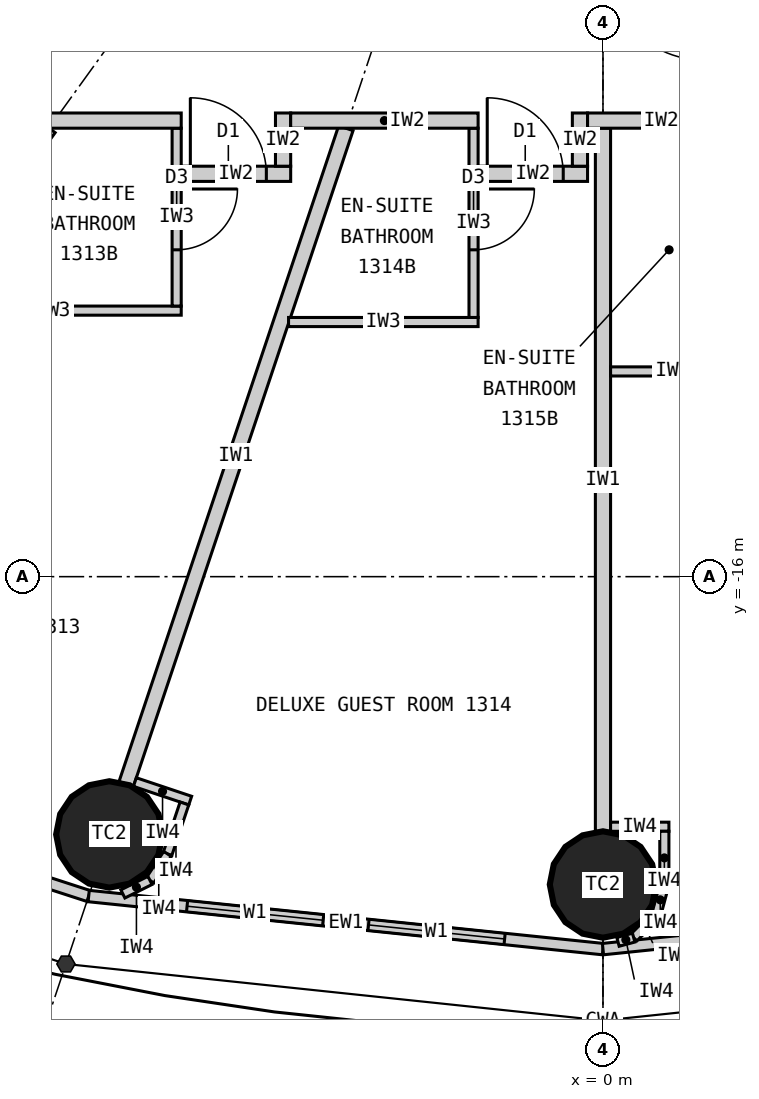
"""IFC4 building model, lengths in metres.
Left out: names, types, materials, properties, quantities, classifications, styles, units other than length and angle.
Written with IfcOpenShell. Run it as: python <this file> out.ifc"""

import sys

from ifc_helpers import new_model, si_unit, direction, frame, frame_2d, origin, origin_2d, place, context, subcontext, project, spatial, rectangle, circle, extrude, element, fill, save


model = new_model("IFC4")
c1 = context("Model", 3, precision=1e-05, world=origin(), true_north=direction((0.0, 1.0)))
c2 = subcontext(c1, "Body", "Model", "MODEL_VIEW")
j1 = project(units=[si_unit("LENGTHUNIT", "METRE"), si_unit("PLANEANGLEUNIT", "RADIAN")], contexts=[c1])
p1 = place(None, origin())
s1 = spatial("IfcSite", under=j1, at=p1, CompositionType="ELEMENT")
p2 = place(p1, origin())
s2 = spatial("IfcBuilding", under=s1, at=p2, CompositionType="ELEMENT")
p3 = place(p2, frame((0.0, 0.0, 57.3)))
s3 = spatial("IfcBuildingStorey", under=s2, at=p3, CompositionType="ELEMENT", Elevation=57.3)
for number, where, z_axis, x_axis in (
    (1, (-6.495, -19.391, 0.0), (0.0, 0.0, 1.0), (1.0, 0.0, 0.0)),
    (2, (0.0, -20.05, 0.0), (0.0, 0.0, 1.0), (1.0, 0.0, 0.0)),
):
    element("IfcColumn", number, at=place(p3, frame(where, z_axis=z_axis, x_axis=x_axis)), inside=s3, PredefinedType="COLUMN", context=c2, shape_type="SweptSolid", body=[
        extrude(circle(Radius=0.7, at=origin_2d()), origin(), (0.0, 0.0, 1.0), 3.3),
    ])
p4 = place(p3, frame((-13.096, -18.147, 0.0), z_axis=(0.0, 0.0, 1.0), x_axis=(0.951137534625, -0.308767534285, 0.0)))
e3 = element("IfcWall", 3, at=p4, inside=s3, PredefinedType="ELEMENTEDWALL", context=c2, shape_type="SweptSolid", body=[
    extrude(rectangle(XDim=6.655, YDim=0.15, at=frame_2d((3.328, 0.0))), origin(), (0.0, 0.0, 1.0), 3.12),
])
p5 = place(p4, frame((1.228, 0.0, 0.9)))
e4 = element("IfcOpeningElement", 4, at=p5, cuts=e3, PredefinedType="OPENING", context=c2, shape_type="SweptSolid", body=[
    extrude(rectangle(XDim=1.8, YDim=1.9, at=frame_2d((0.9, 0.95))), frame((0.0, 0.085, 0.0), z_axis=(0.0, -1.0, 0.0), x_axis=(1.0, 0.0, 0.0)), (0.0, 0.0, 1.0), 0.17),
])
p6 = place(p4, frame((3.628, 0.0, 0.9)))
e5 = element("IfcOpeningElement", 5, at=p6, cuts=e3, PredefinedType="OPENING", context=c2, shape_type="SweptSolid", body=[
    extrude(rectangle(XDim=1.8, YDim=1.9, at=frame_2d((0.9, 0.95))), frame((0.0, 0.085, 0.0), z_axis=(0.0, -1.0, 0.0), x_axis=(1.0, 0.0, 0.0)), (0.0, 0.0, 1.0), 0.17),
])
p7 = place(p3, frame((-6.766, -20.202, 0.0), z_axis=(0.0, 0.0, 1.0), x_axis=(0.994721394369, -0.102612609291, 0.0)))
e6 = element("IfcWall", 6, at=p7, inside=s3, PredefinedType="ELEMENTEDWALL", context=c2, shape_type="SweptSolid", body=[
    extrude(rectangle(XDim=6.802, YDim=0.15, at=frame_2d((3.401, 0.0))), origin(), (0.0, 0.0, 1.0), 3.12),
])
p8 = place(p7, frame((1.301, 0.0, 0.9)))
e7 = element("IfcOpeningElement", 7, at=p8, cuts=e6, PredefinedType="OPENING", context=c2, shape_type="SweptSolid", body=[
    extrude(rectangle(XDim=1.8, YDim=1.9, at=frame_2d((0.9, 0.95))), frame((0.0, 0.085, 0.0), z_axis=(0.0, -1.0, 0.0), x_axis=(1.0, 0.0, 0.0)), (0.0, 0.0, 1.0), 0.17),
])
p9 = place(p7, frame((3.701, 0.0, 0.9)))
e8 = element("IfcOpeningElement", 8, at=p9, cuts=e6, PredefinedType="OPENING", context=c2, shape_type="SweptSolid", body=[
    extrude(rectangle(XDim=1.8, YDim=1.9, at=frame_2d((0.9, 0.95))), frame((0.0, 0.085, 0.0), z_axis=(0.0, -1.0, 0.0), x_axis=(1.0, 0.0, 0.0)), (0.0, 0.0, 1.0), 0.17),
])
p10 = place(p3, frame((0.0, -20.9, 0.0), z_axis=(0.0, 0.0, 1.0), x_axis=(0.994721394369, 0.102612609291, 0.0)))
e9 = element("IfcWall", 9, at=p10, inside=s3, PredefinedType="ELEMENTEDWALL", context=c2, shape_type="SweptSolid", body=[
    extrude(rectangle(XDim=6.802, YDim=0.15, at=frame_2d((3.401, 0.0))), origin(), (0.0, 0.0, 1.0), 3.12),
])
p11 = place(p10, frame((1.301, 0.0, 0.9)))
e10 = element("IfcOpeningElement", 10, at=p11, cuts=e9, PredefinedType="OPENING", context=c2, shape_type="SweptSolid", body=[
    extrude(rectangle(XDim=1.8, YDim=1.9, at=frame_2d((0.9, 0.95))), frame((0.0, 0.085, 0.0), z_axis=(0.0, -1.0, 0.0), x_axis=(1.0, 0.0, 0.0)), (0.0, 0.0, 1.0), 0.17),
])
p12 = place(p10, frame((3.701, 0.0, 0.9)))
e11 = element("IfcOpeningElement", 11, at=p12, cuts=e9, PredefinedType="OPENING", context=c2, shape_type="SweptSolid", body=[
    extrude(rectangle(XDim=1.8, YDim=1.9, at=frame_2d((0.9, 0.95))), frame((0.0, 0.085, 0.0), z_axis=(0.0, -1.0, 0.0), x_axis=(1.0, 0.0, 0.0)), (0.0, 0.0, 1.0), 0.17),
])
p13 = place(p3, frame((-7.289, -10.1, 0.0), z_axis=(0.0, 0.0, 1.0), x_axis=(-0.585198353053, -0.810890182197, 0.0)))
e12 = element("IfcWall", 12, at=p13, inside=s3, PredefinedType="PARTITIONING", context=c2, shape_type="SweptSolid", body=[
    extrude(rectangle(XDim=8.36, YDim=0.2, at=frame_2d((4.18, 0.0))), origin(), (0.0, 0.0, 1.0), 2.32),
])
p14 = place(p3, frame((-3.383, -10.1, 0.0), z_axis=(0.0, 0.0, 1.0), x_axis=(-0.31759592231, -0.948226149256, 0.0)))
e13 = element("IfcWall", 13, at=p14, inside=s3, PredefinedType="PARTITIONING", context=c2, shape_type="SweptSolid", body=[
    extrude(rectangle(XDim=9.098, YDim=0.2, at=frame_2d((4.549, 0.0))), origin(), (0.0, 0.0, 1.0), 2.32),
])
p15 = place(p3, frame((0.0, -10.1, 0.0), z_axis=(0.0, 0.0, 1.0), x_axis=(0.0, -1.0, 0.0)))
e14 = element("IfcWall", 14, at=p15, inside=s3, PredefinedType="PARTITIONING", context=c2, shape_type="SweptSolid", body=[
    extrude(rectangle(XDim=9.25, YDim=0.2, at=frame_2d((4.625, 0.0))), origin(), (0.0, 0.0, 1.0), 2.32),
])
p16 = place(p3, frame((-8.921, -12.5, 0.0), z_axis=(0.0, 0.0, 1.0), x_axis=(1.0, 0.0, 0.0)))
e15 = element("IfcWall", 15, at=p16, inside=s3, PredefinedType="PARTITIONING", context=c2, shape_type="SweptSolid", body=[
    extrude(rectangle(XDim=3.372, YDim=0.12, at=frame_2d((1.686, 0.0))), origin(), (0.0, 0.0, 1.0), 3.12),
])
p17 = place(p3, frame((-5.609, -10.1, 0.0), z_axis=(0.0, 0.0, 1.0), x_axis=(0.0, -1.0, 0.0)))
e16 = element("IfcWall", 16, at=p17, inside=s3, PredefinedType="PARTITIONING", context=c2, shape_type="SweptSolid", body=[
    extrude(rectangle(XDim=2.34, YDim=0.12, at=frame_2d((1.17, 0.0))), origin(), (0.0, 0.0, 1.0), 3.12),
])
p18 = place(p17, frame((0.8, 0.0, 0.0)))
e17 = element("IfcOpeningElement", 17, at=p18, cuts=e16, PredefinedType="OPENING", context=c2, shape_type="SweptSolid", body=[
    extrude(rectangle(XDim=0.8, YDim=2.1, at=frame_2d((0.4, 1.05))), frame((0.0, 0.07, 0.0), z_axis=(0.0, -1.0, 0.0), x_axis=(1.0, 0.0, 0.0)), (0.0, 0.0, 1.0), 0.14),
])
p19 = place(p3, frame((-4.137, -12.65, 0.0), z_axis=(0.0, 0.0, 1.0), x_axis=(1.0, 0.0, 0.0)))
e18 = element("IfcWall", 18, at=p19, inside=s3, PredefinedType="PARTITIONING", context=c2, shape_type="SweptSolid", body=[
    extrude(rectangle(XDim=2.494, YDim=0.12, at=frame_2d((1.247, 0.0))), origin(), (0.0, 0.0, 1.0), 3.12),
])
p20 = place(p3, frame((-1.703, -10.1, 0.0), z_axis=(0.0, 0.0, 1.0), x_axis=(0.0, -1.0, 0.0)))
e19 = element("IfcWall", 19, at=p20, inside=s3, PredefinedType="PARTITIONING", context=c2, shape_type="SweptSolid", body=[
    extrude(rectangle(XDim=2.49, YDim=0.12, at=frame_2d((1.245, 0.0))), origin(), (0.0, 0.0, 1.0), 3.12),
])
p21 = place(p20, frame((0.8, 0.0, 0.0)))
e20 = element("IfcOpeningElement", 20, at=p21, cuts=e19, PredefinedType="OPENING", context=c2, shape_type="SweptSolid", body=[
    extrude(rectangle(XDim=0.8, YDim=2.1, at=frame_2d((0.4, 1.05))), frame((0.0, 0.07, 0.0), z_axis=(0.0, -1.0, 0.0), x_axis=(1.0, 0.0, 0.0)), (0.0, 0.0, 1.0), 0.14),
])
p22 = place(p3, frame((0.1, -13.3, 0.0), z_axis=(0.0, 0.0, 1.0), x_axis=(1.0, 0.0, 0.0)))
e21 = element("IfcWall", 21, at=p22, inside=s3, PredefinedType="PARTITIONING", context=c2, shape_type="SweptSolid", body=[
    extrude(rectangle(XDim=1.64, YDim=0.12, at=frame_2d((0.82, 0.0))), origin(), (0.0, 0.0, 1.0), 3.12),
])
p23 = place(p3, frame((-4.109, -10.7, 0.0), z_axis=(0.0, 0.0, 1.0), x_axis=(-1.0, 0.0, 0.0)))
e22 = element("IfcWall", 22, at=p23, inside=s3, PredefinedType="PARTITIONING", context=c2, shape_type="SweptSolid", body=[
    extrude(rectangle(XDim=1.44, YDim=0.2, at=frame_2d((0.72, 0.0))), origin(), (0.0, 0.0, 1.0), 3.12),
])
p24 = place(p23, frame((0.32, 0.0, 0.0)))
e23 = element("IfcOpeningElement", 23, at=p24, cuts=e22, PredefinedType="OPENING", context=c2, shape_type="SweptSolid", body=[
    extrude(rectangle(XDim=1.0, YDim=2.2, at=frame_2d((0.5, 1.1))), frame((0.0, 0.11, 0.0), z_axis=(0.0, -1.0, 0.0), x_axis=(1.0, 0.0, 0.0)), (0.0, 0.0, 1.0), 0.22),
])
p25 = place(p3, frame((-4.209, -9.9, 0.0), z_axis=(0.0, 0.0, 1.0), x_axis=(0.0, -1.0, 0.0)))
e24 = element("IfcWall", 24, at=p25, inside=s3, PredefinedType="PARTITIONING", context=c2, shape_type="SweptSolid", body=[
    extrude(rectangle(XDim=0.7, YDim=0.2, at=frame_2d((0.35, 0.0))), origin(), (0.0, 0.0, 1.0), 3.12),
])
p26 = place(p3, frame((-0.203, -10.7, 0.0), z_axis=(0.0, 0.0, 1.0), x_axis=(-1.0, 0.0, 0.0)))
e25 = element("IfcWall", 25, at=p26, inside=s3, PredefinedType="PARTITIONING", context=c2, shape_type="SweptSolid", body=[
    extrude(rectangle(XDim=1.44, YDim=0.2, at=frame_2d((0.72, 0.0))), origin(), (0.0, 0.0, 1.0), 3.12),
])
p27 = place(p26, frame((0.32, 0.0, 0.0)))
e26 = element("IfcOpeningElement", 26, at=p27, cuts=e25, PredefinedType="OPENING", context=c2, shape_type="SweptSolid", body=[
    extrude(rectangle(XDim=1.0, YDim=2.2, at=frame_2d((0.5, 1.1))), frame((0.0, 0.11, 0.0), z_axis=(0.0, -1.0, 0.0), x_axis=(1.0, 0.0, 0.0)), (0.0, 0.0, 1.0), 0.22),
])
p28 = place(p3, frame((-0.303, -9.9, 0.0), z_axis=(0.0, 0.0, 1.0), x_axis=(0.0, -1.0, 0.0)))
e27 = element("IfcWall", 27, at=p28, inside=s3, PredefinedType="PARTITIONING", context=c2, shape_type="SweptSolid", body=[
    extrude(rectangle(XDim=0.7, YDim=0.2, at=frame_2d((0.35, 0.0))), origin(), (0.0, 0.0, 1.0), 3.12),
])
p29 = place(p3, frame((1.74, -10.0, 0.0), z_axis=(0.0, 0.0, 1.0), x_axis=(-1.0, 0.0, 0.0)))
e28 = element("IfcWall", 28, at=p29, inside=s3, PredefinedType="PARTITIONING", context=c2, shape_type="SweptSolid", body=[
    extrude(rectangle(XDim=1.943, YDim=0.2, at=frame_2d((0.971, 0.0))), origin(), (0.0, 0.0, 1.0), 3.12),
])
p30 = place(p3, frame((-1.643, -10.0, 0.0), z_axis=(0.0, 0.0, 1.0), x_axis=(-1.0, 0.0, 0.0)))
e29 = element("IfcWall", 29, at=p30, inside=s3, PredefinedType="PARTITIONING", context=c2, shape_type="SweptSolid", body=[
    extrude(rectangle(XDim=2.466, YDim=0.2, at=frame_2d((1.233, 0.0))), origin(), (0.0, 0.0, 1.0), 3.12),
])
p31 = place(p3, frame((-5.549, -10.0, 0.0), z_axis=(0.0, 0.0, 1.0), x_axis=(-1.0, 0.0, 0.0)))
e30 = element("IfcWall", 30, at=p31, inside=s3, PredefinedType="PARTITIONING", context=c2, shape_type="SweptSolid", body=[
    extrude(rectangle(XDim=3.896, YDim=0.2, at=frame_2d((1.948, 0.0))), origin(), (0.0, 0.0, 1.0), 3.12),
])
p32 = place(p3, frame((-6.159, -18.702, 0.0), z_axis=(0.0, 0.0, 1.0), x_axis=(0.948173154049, -0.31775410295, 0.0)))
e31 = element("IfcWall", 31, at=p32, inside=s3, PredefinedType="PARTITIONING", context=c2, shape_type="SweptSolid", body=[
    extrude(rectangle(XDim=0.768, YDim=0.12, at=frame_2d((0.384, 0.0))), origin(), (0.0, 0.0, 1.0), 3.12),
])
p33 = place(p3, frame((-5.507, -18.984, 0.0), z_axis=(0.0, 0.0, 1.0), x_axis=(-0.317692050622, -0.948193946918, 0.0)))
e32 = element("IfcWall", 32, at=p33, inside=s3, PredefinedType="PARTITIONING", context=c2, shape_type="SweptSolid", body=[
    extrude(rectangle(XDim=0.7, YDim=0.12, at=frame_2d((0.35, 0.0))), origin(), (0.0, 0.0, 1.0), 3.12),
])
p34 = place(p3, frame((-5.729, -19.648, 0.0), z_axis=(0.0, 0.0, 1.0), x_axis=(-0.552135764955, -0.833754218615, 0.0)))
e33 = element("IfcWall", 33, at=p34, inside=s3, PredefinedType="PARTITIONING", context=c2, shape_type="SweptSolid", body=[
    extrude(rectangle(XDim=0.418, YDim=0.12, at=frame_2d((0.209, 0.0))), origin(), (0.0, 0.0, 1.0), 3.12),
])
p35 = place(p3, frame((-5.96, -19.996, 0.0), z_axis=(0.0, 0.0, 1.0), x_axis=(-0.895160725913, -0.445743507842, 0.0)))
e34 = element("IfcWall", 34, at=p35, inside=s3, PredefinedType="PARTITIONING", context=c2, shape_type="SweptSolid", body=[
    extrude(rectangle(XDim=0.399, YDim=0.12, at=frame_2d((0.199, 0.0))), origin(), (0.0, 0.0, 1.0), 3.12),
])
p36 = place(p3, frame((0.1, -19.29, 0.0), z_axis=(0.0, 0.0, 1.0), x_axis=(1.0, 0.0, 0.0)))
e35 = element("IfcWall", 35, at=p36, inside=s3, PredefinedType="PARTITIONING", context=c2, shape_type="SweptSolid", body=[
    extrude(rectangle(XDim=0.767, YDim=0.12, at=frame_2d((0.384, 0.0))), origin(), (0.0, 0.0, 1.0), 3.12),
])
p37 = place(p3, frame((0.808, -19.35, 0.0), z_axis=(0.0, 0.0, 1.0), x_axis=(0.0, -1.0, 0.0)))
e36 = element("IfcWall", 36, at=p37, inside=s3, PredefinedType="PARTITIONING", context=c2, shape_type="SweptSolid", body=[
    extrude(rectangle(XDim=0.7, YDim=0.12, at=frame_2d((0.35, 0.0))), origin(), (0.0, 0.0, 1.0), 3.12),
])
p38 = place(p3, frame((0.808, -20.05, 0.0), z_axis=(0.0, 0.0, 1.0), x_axis=(-0.2592614205, -0.965807183573, 0.0)))
e37 = element("IfcWall", 37, at=p38, inside=s3, PredefinedType="PARTITIONING", context=c2, shape_type="SweptSolid", body=[
    extrude(rectangle(XDim=0.418, YDim=0.12, at=frame_2d((0.209, 0.0))), origin(), (0.0, 0.0, 1.0), 3.12),
])
p39 = place(p3, frame((0.699, -20.454, 0.0), z_axis=(0.0, 0.0, 1.0), x_axis=(-0.707106781187, -0.707106781187, 0.0)))
e38 = element("IfcWall", 38, at=p39, inside=s3, PredefinedType="PARTITIONING", context=c2, shape_type="SweptSolid", body=[
    extrude(rectangle(XDim=0.418, YDim=0.12, at=frame_2d((0.209, 0.0))), origin(), (0.0, 0.0, 1.0), 3.12),
])
p40 = place(p3, frame((0.404, -20.749, 0.0), z_axis=(0.0, 0.0, 1.0), x_axis=(-0.965759066438, -0.25944060128, 0.0)))
e39 = element("IfcWall", 39, at=p40, inside=s3, PredefinedType="PARTITIONING", context=c2, shape_type="SweptSolid", body=[
    extrude(rectangle(XDim=0.214, YDim=0.12, at=frame_2d((0.107, 0.0))), origin(), (0.0, 0.0, 1.0), 3.12),
])
p41 = place(p8, origin())
e40 = element("IfcWindow", 40, at=p41, inside=s3, PartitioningType="SINGLE_PANEL", PredefinedType="WINDOW", context=c2, shape_type="SweptSolid", body=[
    extrude(rectangle(XDim=1.8, YDim=1.9, at=frame_2d((0.9, 0.95))), frame((0.0, 0.03, 0.0), z_axis=(0.0, -1.0, 0.0), x_axis=(1.0, 0.0, 0.0)), (0.0, 0.0, 1.0), 0.06),
])
fill(e7, e40)
p42 = place(p9, origin())
e41 = element("IfcWindow", 41, at=p42, inside=s3, PartitioningType="SINGLE_PANEL", PredefinedType="WINDOW", context=c2, shape_type="SweptSolid", body=[
    extrude(rectangle(XDim=1.8, YDim=1.9, at=frame_2d((0.9, 0.95))), frame((0.0, 0.03, 0.0), z_axis=(0.0, -1.0, 0.0), x_axis=(1.0, 0.0, 0.0)), (0.0, 0.0, 1.0), 0.06),
])
fill(e8, e41)
p43 = place(p18, origin())
e42 = element("IfcDoor", 42, at=p43, inside=s3, OperationType="SINGLE_SWING_LEFT", PredefinedType="DOOR", context=c2, shape_type="SweptSolid", body=[
    extrude(rectangle(XDim=0.8, YDim=2.1, at=frame_2d((0.4, 1.05))), frame((0.0, 0.025, 0.0), z_axis=(0.0, -1.0, 0.0), x_axis=(1.0, 0.0, 0.0)), (0.0, 0.0, 1.0), 0.05),
])
fill(e17, e42)
p44 = place(p24, origin())
e43 = element("IfcDoor", 43, at=p44, inside=s3, OperationType="SINGLE_SWING_RIGHT", PredefinedType="DOOR", context=c2, shape_type="SweptSolid", body=[
    extrude(rectangle(XDim=1.0, YDim=2.2, at=frame_2d((0.5, 1.1))), frame((0.0, 0.025, 0.0), z_axis=(0.0, -1.0, 0.0), x_axis=(1.0, 0.0, 0.0)), (0.0, 0.0, 1.0), 0.05),
])
fill(e23, e43)
p45 = place(p21, origin())
e44 = element("IfcDoor", 44, at=p45, inside=s3, OperationType="SINGLE_SWING_LEFT", PredefinedType="DOOR", context=c2, shape_type="SweptSolid", body=[
    extrude(rectangle(XDim=0.8, YDim=2.1, at=frame_2d((0.4, 1.05))), frame((0.0, 0.025, 0.0), z_axis=(0.0, -1.0, 0.0), x_axis=(1.0, 0.0, 0.0)), (0.0, 0.0, 1.0), 0.05),
])
fill(e20, e44)
p46 = place(p27, origin())
e45 = element("IfcDoor", 45, at=p46, inside=s3, OperationType="SINGLE_SWING_RIGHT", PredefinedType="DOOR", context=c2, shape_type="SweptSolid", body=[
    extrude(rectangle(XDim=1.0, YDim=2.2, at=frame_2d((0.5, 1.1))), frame((0.0, 0.025, 0.0), z_axis=(0.0, -1.0, 0.0), x_axis=(1.0, 0.0, 0.0)), (0.0, 0.0, 1.0), 0.05),
])
fill(e26, e45)
save(model, sys.argv[1])
